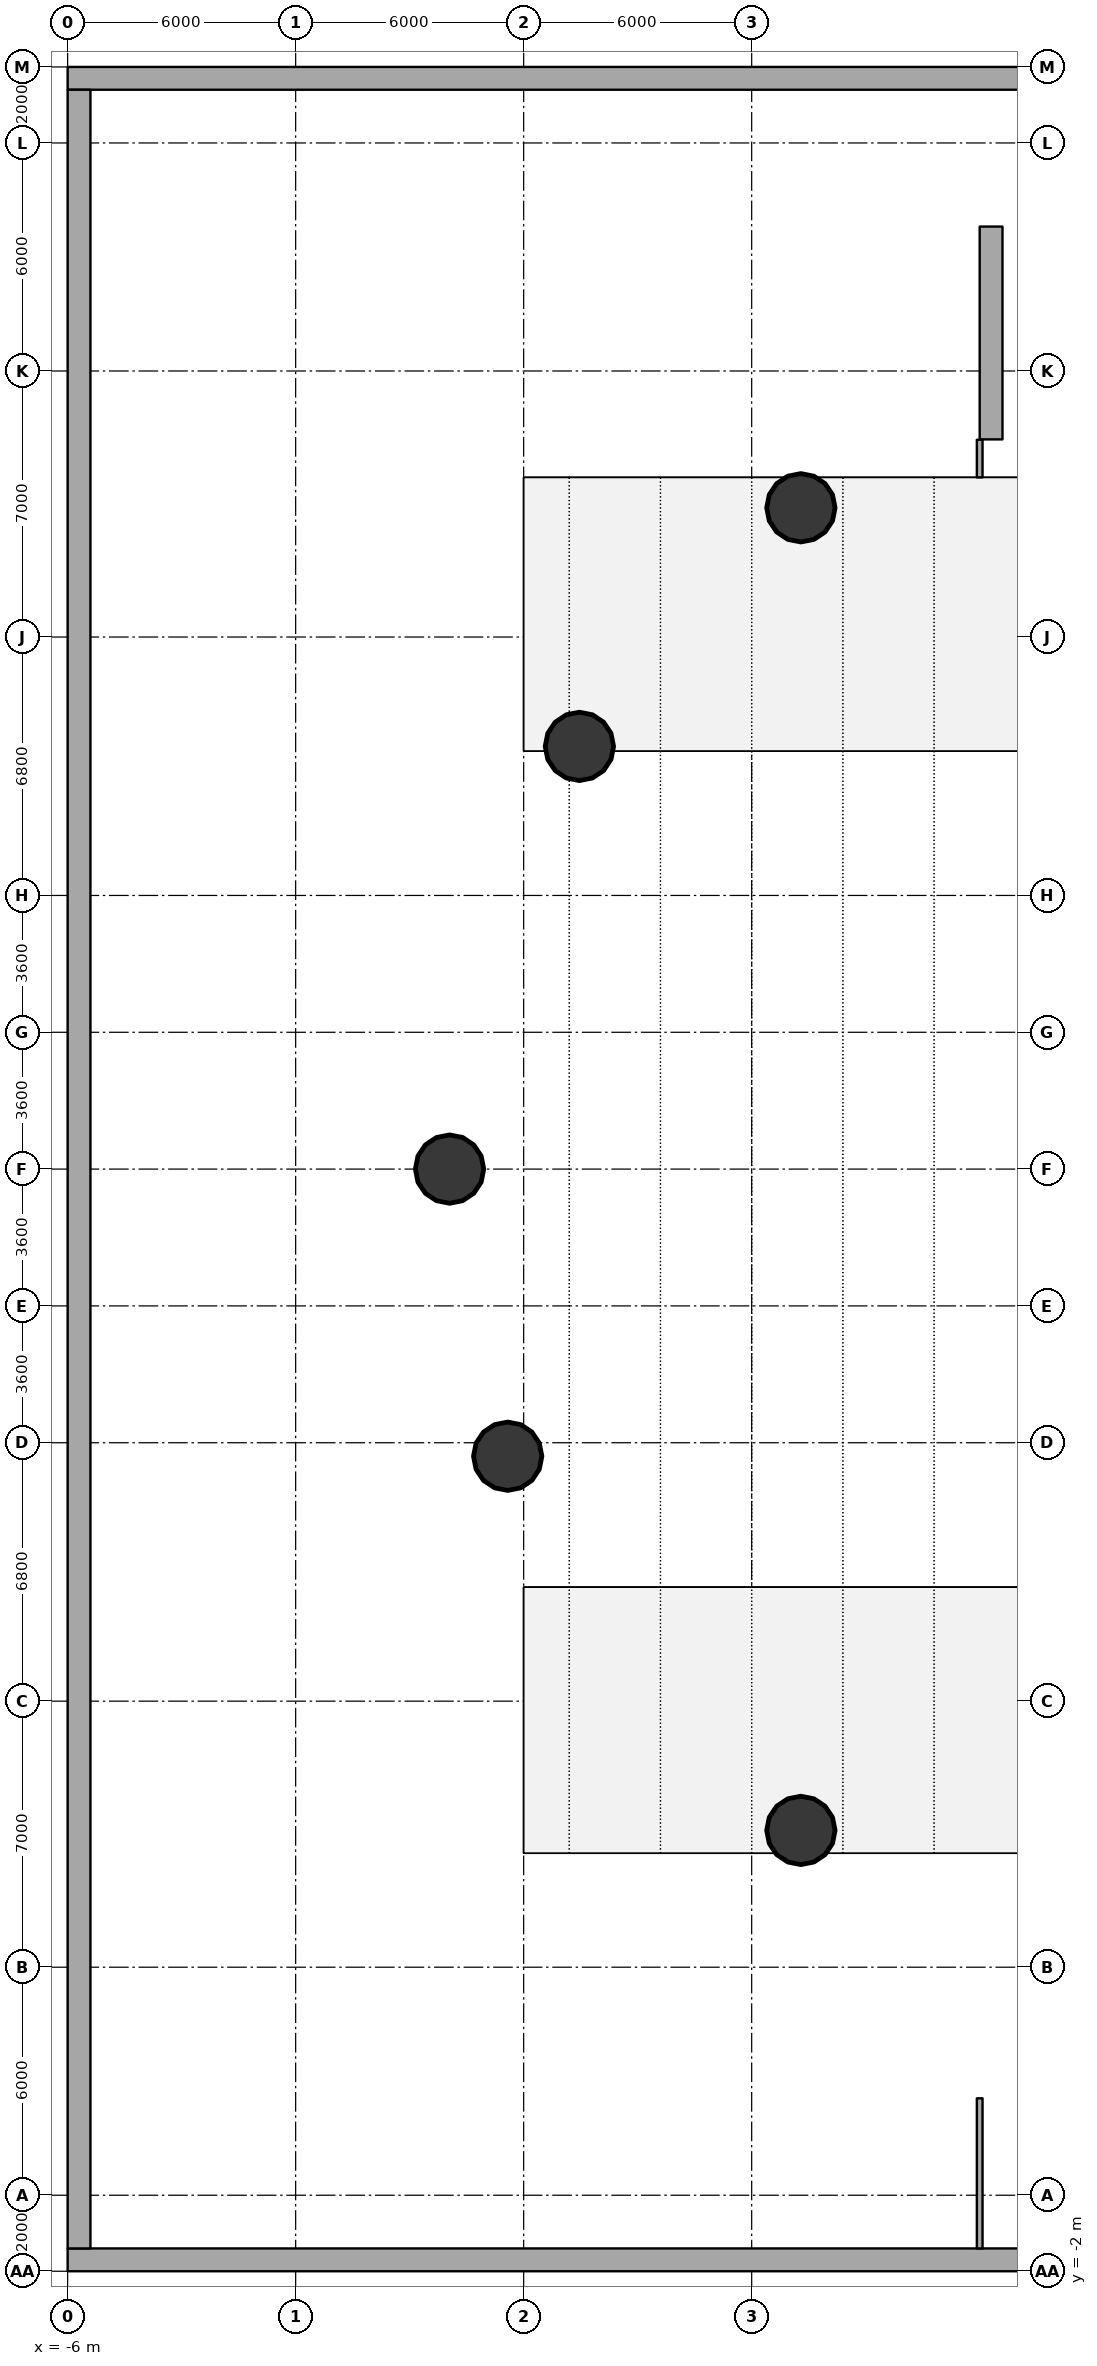
"""IFC4 building model, lengths in metres.
Left out: names, types, materials, properties, quantities, classifications, styles, units other than length and angle.
Written with IfcOpenShell. Run it as: python <this file> out.ifc"""

import sys

from ifc_helpers import new_model, si_unit, direction, frame, frame_2d, origin, origin_2d, place, context, subcontext, project, spatial, rectangle, hollow_circle, extrude, source, transform, mapped, element, fill, save


model = new_model("IFC4")
c1 = context("Model", 3, precision=1e-05, world=origin(), true_north=direction((0.0, 1.0)))
c2 = subcontext(c1, "Body", "Model", "MODEL_VIEW")
j1 = project(units=[si_unit("LENGTHUNIT", "METRE"), si_unit("PLANEANGLEUNIT", "RADIAN")], contexts=[c1])
p1 = place(None, origin())
s1 = spatial("IfcSite", under=j1, at=p1, CompositionType="ELEMENT")
p2 = place(p1, origin())
s2 = spatial("IfcBuilding", under=s1, at=p2, CompositionType="ELEMENT")
p3 = place(p2, frame((0.0, 0.0, -9.0)))
s3 = spatial("IfcBuildingStorey", under=s2, at=p3, CompositionType="ELEMENT", Elevation=-9.0)
p4 = place(p3, frame((18.3, 46.2, 0.0), z_axis=(0.0, 0.0, 1.0), x_axis=(0.0, 1.0, 0.0)))
e1 = element("IfcWall", 1, at=p4, inside=s3, PredefinedType="SHEAR", context=c2, shape_type="SweptSolid", body=[
    extrude(rectangle(XDim=5.6, YDim=0.6, at=frame_2d((2.8, 0.0))), origin(), (0.0, 0.0, 1.0), 4.55),
])
for number, where, z_axis, x_axis in (
    (2, (-6.0, 55.7, 0.0), (0.0, 0.0, 1.0), (1.0, 0.0, 0.0)),
    (3, (78.0, -1.7, 0.0), (0.0, 0.0, 1.0), (-1.0, 0.0, 0.0)),
):
    element("IfcWall", number, at=place(p3, frame(where, z_axis=z_axis, x_axis=x_axis)), inside=s3, PredefinedType="SHEAR", context=c2, shape_type="SweptSolid", body=[
        extrude(rectangle(XDim=84.0, YDim=0.6, at=frame_2d((42.0, 0.0))), origin(), (0.0, 0.0, 1.0), 4.2),
    ])
p5 = place(p3, frame((-5.7, -1.4, 0.0), z_axis=(0.0, 0.0, 1.0), x_axis=(0.0, 1.0, 0.0)))
e4 = element("IfcWall", 4, at=p5, inside=s3, PredefinedType="SHEAR", context=c2, shape_type="SweptSolid", body=[
    extrude(rectangle(XDim=56.8, YDim=0.6, at=frame_2d((28.4, 0.0))), origin(), (0.0, 0.0, 1.0), 4.2),
])
for number, where, z_axis, x_axis in (
    (5, (13.295, 44.401, 0.0), (0.0, 0.0, 1.0), (1.0, 0.0, 0.0)),
    (6, (7.466, 38.122, 0.0), (0.0, 0.0, 1.0), (1.0, 0.0, 0.0)),
    (7, (4.05, 27.0, 0.0), (0.0, 0.0, 1.0), (1.0, 0.0, 0.0)),
    (8, (5.58, 19.445, 0.0), (0.0, 0.0, 1.0), (1.0, 0.0, 0.0)),
    (9, (13.295, 9.599, 0.0), (0.0, 0.0, 1.0), (1.0, 0.0, 0.0)),
):
    element("IfcColumn", number, at=place(p3, frame(where, z_axis=z_axis, x_axis=x_axis)), inside=s3, PredefinedType="COLUMN", context=c2, shape_type="SweptSolid", body=[
        extrude(hollow_circle(Radius=0.9, WallThickness=0.05, at=origin_2d()), origin(), (0.0, 0.0, 1.0), 4.5),
    ])
p6 = place(p3, frame((18.0, -1.4, 0.0), z_axis=(0.0, 0.0, 1.0), x_axis=(0.0, 1.0, 0.0)))
e10 = element("IfcWall", 10, at=p6, inside=s3, PredefinedType="PARTITIONING", context=c2, shape_type="SweptSolid", body=[
    extrude(rectangle(XDim=3.95, YDim=0.15, at=frame_2d((1.975, 0.0))), origin(), (0.0, 0.0, 1.0), 3.385),
])
p7 = place(p6, frame((1.425, 0.0, 0.0)))
e11 = element("IfcOpeningElement", 11, at=p7, cuts=e10, PredefinedType="OPENING", context=c2, shape_type="SweptSolid", body=[
    extrude(rectangle(XDim=1.1, YDim=2.15, at=origin_2d()), frame((0.55, 0.085, 1.075), z_axis=(0.0, -1.0, 0.0), x_axis=(1.0, 0.0, 0.0)), (0.0, 0.0, 1.0), 0.17),
])
p8 = place(p3, frame((18.0, 45.2, 0.0), z_axis=(0.0, 0.0, 1.0), x_axis=(0.0, 1.0, 0.0)))
e12 = element("IfcWall", 12, at=p8, inside=s3, PredefinedType="PARTITIONING", context=c2, shape_type="SweptSolid", body=[
    extrude(rectangle(XDim=0.99, YDim=0.15, at=frame_2d((0.495, 0.0))), origin(), (0.0, 0.0, 1.0), 4.2),
])
m1 = source(origin(), c2, "Body", "SweptSolid", [
    extrude(rectangle(XDim=1.1, YDim=2.15, at=origin_2d()), frame((0.55, 0.025, 1.075), z_axis=(0.0, -1.0, 0.0), x_axis=(1.0, 0.0, 0.0)), (0.0, 0.0, 1.0), 0.05),
])
p9 = place(p7, origin())
e13 = element("IfcDoor", 13, at=p9, inside=s3, OperationType="SINGLE_SWING_LEFT", PredefinedType="DOOR", context=c2, shape_type="MappedRepresentation", body=[
    mapped(m1, transform((0.0, 0.0, 0.0), x_axis=(1.0, 0.0, 0.0), y_axis=(0.0, 1.0, 0.0), z_axis=(0.0, 0.0, 1.0), scale=1.0)),
])
fill(e11, e13)
save(model, sys.argv[1])
